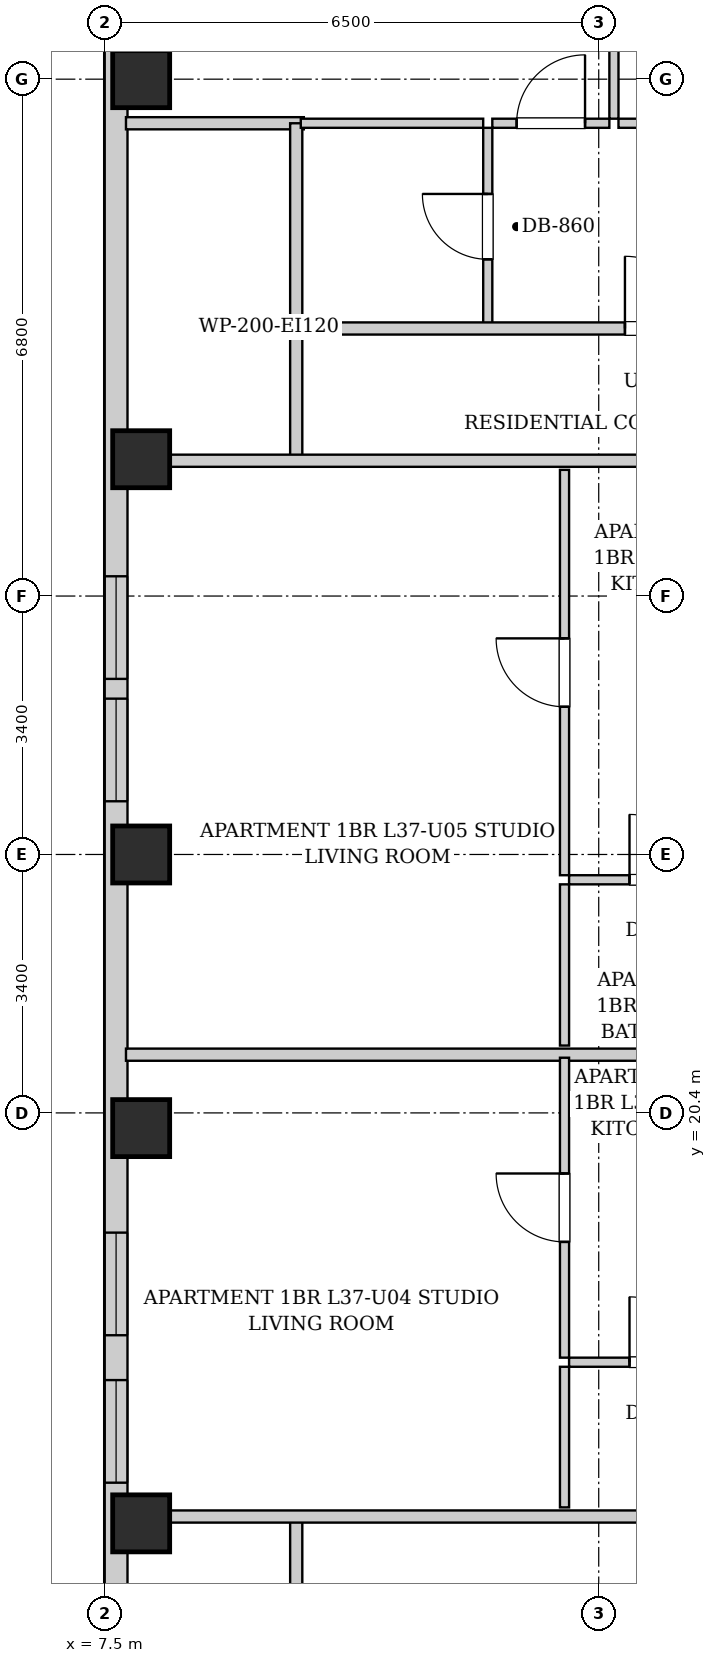
"""IFC4 building model, lengths in metres.
Left out: names, types, materials, properties, quantities, classifications, styles, units other than length and angle.
Written with IfcOpenShell. Run it as: python <this file> out.ifc"""

import sys

from ifc_helpers import new_model, si_unit, direction, frame, frame_2d, origin, origin_2d, place, context, subcontext, project, spatial, rectangle, extrude, element, fill, save


model = new_model("IFC4")
c1 = context("Model", 3, precision=1e-05, world=origin(), true_north=direction((0.0, 1.0)))
c2 = subcontext(c1, "Body", "Model", "MODEL_VIEW")
j1 = project(units=[si_unit("LENGTHUNIT", "METRE"), si_unit("PLANEANGLEUNIT", "RADIAN")], contexts=[c1])
p1 = place(None, origin())
s1 = spatial("IfcSite", under=j1, at=p1, CompositionType="ELEMENT")
p2 = place(p1, origin())
s2 = spatial("IfcBuilding", under=s1, at=p2, CompositionType="ELEMENT")
p3 = place(p2, frame((0.0, 0.0, 130.9)))
s3 = spatial("IfcBuildingStorey", under=s2, at=p3, CompositionType="ELEMENT", Elevation=130.9)
for number, where, z_axis, x_axis in (
    (1, (7.98, 15.0, 0.0), (0.0, 0.0, 1.0), (1.0, 0.0, 0.0)),
    (2, (7.98, 20.2, 0.0), (0.0, 0.0, 1.0), (1.0, 0.0, 0.0)),
    (3, (7.98, 23.8, 0.0), (0.0, 0.0, 1.0), (1.0, 0.0, 0.0)),
    (4, (7.98, 29.0, 0.0), (0.0, 0.0, 1.0), (1.0, 0.0, 0.0)),
    (5, (7.98, 34.0, 0.0), (0.0, 0.0, 1.0), (1.0, 0.0, 0.0)),
):
    element("IfcColumn", number, at=place(p3, frame(where, z_axis=z_axis, x_axis=x_axis)), inside=s3, PredefinedType="COLUMN", context=c2, shape_type="SweptSolid", body=[
        extrude(rectangle(XDim=0.75, YDim=0.75, at=origin_2d()), origin(), (0.0, 0.0, 1.0), 3.25),
    ])
p4 = place(p3, frame((7.65, 6.3, 0.0), z_axis=(0.0, 0.0, 1.0), x_axis=(0.0, 1.0, 0.0)))
e6 = element("IfcWall", 6, at=p4, inside=s3, PredefinedType="SOLIDWALL", context=c2, shape_type="SweptSolid", body=[
    extrude(rectangle(XDim=34.5, YDim=0.3, at=frame_2d((17.25, 0.0))), origin(), (0.0, 0.0, 1.0), 2.99),
])
p5 = place(p4, frame((1.575, 0.0, 0.55)))
e7 = element("IfcOpeningElement", 7, at=p5, cuts=e6, PredefinedType="OPENING", context=c2, shape_type="SweptSolid", body=[
    extrude(rectangle(XDim=1.35, YDim=1.2, at=frame_2d((0.675, 0.6))), frame((0.0, 0.16, 0.0), z_axis=(0.0, -1.0, 0.0), x_axis=(1.0, 0.0, 0.0)), (0.0, 0.0, 1.0), 0.32),
])
p6 = place(p4, frame((30.075, 0.0, 0.55)))
e8 = element("IfcOpeningElement", 8, at=p6, cuts=e6, PredefinedType="OPENING", context=c2, shape_type="SweptSolid", body=[
    extrude(rectangle(XDim=1.35, YDim=1.2, at=frame_2d((0.675, 0.6))), frame((0.0, 0.16, 0.0), z_axis=(0.0, -1.0, 0.0), x_axis=(1.0, 0.0, 0.0)), (0.0, 0.0, 1.0), 0.32),
])
p7 = place(p4, frame((28.235, 0.0, 0.55)))
e9 = element("IfcOpeningElement", 9, at=p7, cuts=e6, PredefinedType="OPENING", context=c2, shape_type="SweptSolid", body=[
    extrude(rectangle(XDim=1.35, YDim=1.2, at=frame_2d((0.675, 0.6))), frame((0.0, 0.16, 0.0), z_axis=(0.0, -1.0, 0.0), x_axis=(1.0, 0.0, 0.0)), (0.0, 0.0, 1.0), 0.32),
])
p8 = place(p4, frame((11.175, 0.0, 0.55)))
e10 = element("IfcOpeningElement", 10, at=p8, cuts=e6, PredefinedType="OPENING", context=c2, shape_type="SweptSolid", body=[
    extrude(rectangle(XDim=1.35, YDim=1.2, at=frame_2d((0.675, 0.6))), frame((0.0, 0.16, 0.0), z_axis=(0.0, -1.0, 0.0), x_axis=(1.0, 0.0, 0.0)), (0.0, 0.0, 1.0), 0.32),
])
p9 = place(p4, frame((9.235, 0.0, 0.55)))
e11 = element("IfcOpeningElement", 11, at=p9, cuts=e6, PredefinedType="OPENING", context=c2, shape_type="SweptSolid", body=[
    extrude(rectangle(XDim=1.35, YDim=1.2, at=frame_2d((0.675, 0.6))), frame((0.0, 0.16, 0.0), z_axis=(0.0, -1.0, 0.0), x_axis=(1.0, 0.0, 0.0)), (0.0, 0.0, 1.0), 0.32),
])
p10 = place(p4, frame((18.2, 0.0, 0.55)))
e12 = element("IfcOpeningElement", 12, at=p10, cuts=e6, PredefinedType="OPENING", context=c2, shape_type="SweptSolid", body=[
    extrude(rectangle(XDim=1.35, YDim=1.2, at=frame_2d((0.675, 0.6))), frame((0.0, 0.16, 0.0), z_axis=(0.0, -1.0, 0.0), x_axis=(1.0, 0.0, 0.0)), (0.0, 0.0, 1.0), 0.32),
])
p11 = place(p4, frame((19.81, 0.0, 0.55)))
e13 = element("IfcOpeningElement", 13, at=p11, cuts=e6, PredefinedType="OPENING", context=c2, shape_type="SweptSolid", body=[
    extrude(rectangle(XDim=1.35, YDim=1.2, at=frame_2d((0.675, 0.6))), frame((0.0, 0.16, 0.0), z_axis=(0.0, -1.0, 0.0), x_axis=(1.0, 0.0, 0.0)), (0.0, 0.0, 1.0), 0.32),
])
for number, where, z_axis, x_axis in (
    (14, (10.02, 13.35, 0.0), (0.0, 0.0, 1.0), (0.0, 1.0, 0.0)),
    (15, (10.02, 28.98, 0.0), (0.0, 0.0, 1.0), (0.0, 1.0, 0.0)),
):
    element("IfcWall", number, at=place(p3, frame(where, z_axis=z_axis, x_axis=x_axis)), inside=s3, PredefinedType="PARTITIONING", context=c2, shape_type="SweptSolid", body=[
        extrude(rectangle(XDim=1.74, YDim=0.16, at=frame_2d((0.87, 0.0))), origin(), (0.0, 0.0, 1.0), 2.99),
    ])
for number, where, z_axis, x_axis in (
    (16, (7.78, 15.09, 0.0), (0.0, 0.0, 1.0), (1.0, 0.0, 0.0)),
    (17, (7.78, 28.98, 0.0), (0.0, 0.0, 1.0), (1.0, 0.0, 0.0)),
):
    element("IfcWall", number, at=place(p3, frame(where, z_axis=z_axis, x_axis=x_axis)), inside=s3, PredefinedType="PARTITIONING", context=c2, shape_type="SweptSolid", body=[
        extrude(rectangle(XDim=8.36, YDim=0.16, at=frame_2d((4.18, 0.0))), origin(), (0.0, 0.0, 1.0), 2.426),
    ])
p12 = place(p3, frame((7.78, 33.42, 0.0), z_axis=(0.0, 0.0, 1.0), x_axis=(1.0, 0.0, 0.0)))
e18 = element("IfcWall", 18, at=p12, inside=s3, PredefinedType="PARTITIONING", context=c2, shape_type="SweptSolid", body=[
    extrude(rectangle(XDim=2.34, YDim=0.16, at=frame_2d((1.17, 0.0))), origin(), (0.0, 0.0, 1.0), 2.99),
])
p13 = place(p3, frame((10.02, 30.76, 0.0), z_axis=(0.0, 0.0, 1.0), x_axis=(0.0, 1.0, 0.0)))
e19 = element("IfcWall", 19, at=p13, inside=s3, PredefinedType="PARTITIONING", context=c2, shape_type="SweptSolid", body=[
    extrude(rectangle(XDim=2.66, YDim=0.16, at=frame_2d((1.33, 0.0))), origin(), (0.0, 0.0, 1.0), 2.99),
])
p14 = place(p3, frame((12.54, 30.76, 0.0), z_axis=(0.0, 0.0, 1.0), x_axis=(0.0, 1.0, 0.0)))
e20 = element("IfcWall", 20, at=p14, inside=s3, PredefinedType="PARTITIONING", context=c2, shape_type="SweptSolid", body=[
    extrude(rectangle(XDim=2.6, YDim=0.12, at=frame_2d((1.3, 0.0))), origin(), (0.0, 0.0, 1.0), 2.99),
])
p15 = place(p14, frame((0.87, 0.0, 0.0)))
e21 = element("IfcOpeningElement", 21, at=p15, cuts=e20, PredefinedType="OPENING", context=c2, shape_type="SweptSolid", body=[
    extrude(rectangle(XDim=0.86, YDim=2.05, at=frame_2d((0.43, 1.025))), frame((0.0, 0.07, 0.0), z_axis=(0.0, -1.0, 0.0), x_axis=(1.0, 0.0, 0.0)), (0.0, 0.0, 1.0), 0.14),
])
p16 = place(p3, frame((10.08, 33.42, 0.0), z_axis=(0.0, 0.0, 1.0), x_axis=(1.0, 0.0, 0.0)))
e22 = element("IfcWall", 22, at=p16, inside=s3, PredefinedType="PARTITIONING", context=c2, shape_type="SweptSolid", body=[
    extrude(rectangle(XDim=2.4, YDim=0.12, at=frame_2d((1.2, 0.0))), origin(), (0.0, 0.0, 1.0), 2.99),
])
p17 = place(p3, frame((12.6, 33.42, 0.0), z_axis=(0.0, 0.0, 1.0), x_axis=(1.0, 0.0, 0.0)))
e23 = element("IfcWall", 23, at=p17, inside=s3, PredefinedType="PARTITIONING", context=c2, shape_type="SweptSolid", body=[
    extrude(rectangle(XDim=1.54, YDim=0.12, at=frame_2d((0.77, 0.0))), origin(), (0.0, 0.0, 1.0), 2.99),
])
p18 = place(p17, frame((0.32, 0.0, 0.0)))
e24 = element("IfcOpeningElement", 24, at=p18, cuts=e23, PredefinedType="OPENING", context=c2, shape_type="SweptSolid", body=[
    extrude(rectangle(XDim=0.9, YDim=2.05, at=frame_2d((0.45, 1.025))), frame((0.0, 0.07, 0.0), z_axis=(0.0, -1.0, 0.0), x_axis=(1.0, 0.0, 0.0)), (0.0, 0.0, 1.0), 0.14),
])
p19 = place(p3, frame((14.26, 33.42, 0.0), z_axis=(0.0, 0.0, 1.0), x_axis=(1.0, 0.0, 0.0)))
e25 = element("IfcWall", 25, at=p19, inside=s3, PredefinedType="PARTITIONING", context=c2, shape_type="SweptSolid", body=[
    extrude(rectangle(XDim=2.78, YDim=0.12, at=frame_2d((1.39, 0.0))), origin(), (0.0, 0.0, 1.0), 2.99),
])
p20 = place(p19, frame((0.94, 0.0, 0.0)))
e26 = element("IfcOpeningElement", 26, at=p20, cuts=e25, PredefinedType="OPENING", context=c2, shape_type="SweptSolid", body=[
    extrude(rectangle(XDim=0.9, YDim=2.05, at=frame_2d((0.45, 1.025))), frame((0.0, 0.07, 0.0), z_axis=(0.0, -1.0, 0.0), x_axis=(1.0, 0.0, 0.0)), (0.0, 0.0, 1.0), 0.14),
])
p21 = place(p3, frame((14.2, 33.48, 0.0), z_axis=(0.0, 0.0, 1.0), x_axis=(0.0, 1.0, 0.0)))
e27 = element("IfcWall", 27, at=p21, inside=s3, PredefinedType="PARTITIONING", context=c2, shape_type="SweptSolid", body=[
    extrude(rectangle(XDim=9.54, YDim=0.12, at=frame_2d((4.77, 0.0))), origin(), (0.0, 0.0, 1.0), 2.99),
])
p22 = place(p21, frame((4.305, 0.0, 0.0)))
e28 = element("IfcOpeningElement", 28, at=p22, cuts=e27, PredefinedType="OPENING", context=c2, shape_type="SweptSolid", body=[
    extrude(rectangle(XDim=0.9, YDim=2.05, at=frame_2d((0.45, 1.025))), frame((0.0, 0.07, 0.0), z_axis=(0.0, -1.0, 0.0), x_axis=(1.0, 0.0, 0.0)), (0.0, 0.0, 1.0), 0.14),
])
p23 = place(p3, frame((7.78, 21.166, 0.0), z_axis=(0.0, 0.0, 1.0), x_axis=(1.0, 0.0, 0.0)))
e29 = element("IfcWall", 29, at=p23, inside=s3, PredefinedType="PARTITIONING", context=c2, shape_type="SweptSolid", body=[
    extrude(rectangle(XDim=8.28, YDim=0.16, at=frame_2d((4.14, 0.0))), origin(), (0.0, 0.0, 1.0), 2.99),
])
p24 = place(p3, frame((13.61, 17.12, 0.0), z_axis=(0.0, 0.0, 1.0), x_axis=(1.0, 0.0, 0.0)))
e30 = element("IfcWall", 30, at=p24, inside=s3, PredefinedType="PARTITIONING", context=c2, shape_type="SweptSolid", body=[
    extrude(rectangle(XDim=2.45, YDim=0.12, at=frame_2d((1.225, 0.0))), origin(), (0.0, 0.0, 1.0), 2.99),
])
p25 = place(p24, frame((0.795, 0.0, 0.0)))
e31 = element("IfcOpeningElement", 31, at=p25, cuts=e30, PredefinedType="OPENING", context=c2, shape_type="SweptSolid", body=[
    extrude(rectangle(XDim=0.86, YDim=2.05, at=frame_2d((0.43, 1.025))), frame((0.0, 0.07, 0.0), z_axis=(0.0, -1.0, 0.0), x_axis=(1.0, 0.0, 0.0)), (0.0, 0.0, 1.0), 0.14),
])
p26 = place(p3, frame((13.55, 15.21, 0.0), z_axis=(0.0, 0.0, 1.0), x_axis=(0.0, 1.0, 0.0)))
e32 = element("IfcWall", 32, at=p26, inside=s3, PredefinedType="PARTITIONING", context=c2, shape_type="SweptSolid", body=[
    extrude(rectangle(XDim=1.85, YDim=0.12, at=frame_2d((0.925, 0.0))), origin(), (0.0, 0.0, 1.0), 2.99),
])
p27 = place(p3, frame((13.55, 17.18, 0.0), z_axis=(0.0, 0.0, 1.0), x_axis=(0.0, 1.0, 0.0)))
e33 = element("IfcWall", 33, at=p27, inside=s3, PredefinedType="PARTITIONING", context=c2, shape_type="SweptSolid", body=[
    extrude(rectangle(XDim=3.946, YDim=0.12, at=frame_2d((1.973, 0.0))), origin(), (0.0, 0.0, 1.0), 2.99),
])
p28 = place(p27, frame((1.523, 0.0, 0.0)))
e34 = element("IfcOpeningElement", 34, at=p28, cuts=e33, PredefinedType="OPENING", context=c2, shape_type="SweptSolid", body=[
    extrude(rectangle(XDim=0.9, YDim=2.05, at=frame_2d((0.45, 1.025))), frame((0.0, 0.07, 0.0), z_axis=(0.0, -1.0, 0.0), x_axis=(1.0, 0.0, 0.0)), (0.0, 0.0, 1.0), 0.14),
])
p29 = place(p3, frame((13.61, 23.467, 0.0), z_axis=(0.0, 0.0, 1.0), x_axis=(1.0, 0.0, 0.0)))
e35 = element("IfcWall", 35, at=p29, inside=s3, PredefinedType="PARTITIONING", context=c2, shape_type="SweptSolid", body=[
    extrude(rectangle(XDim=2.45, YDim=0.12, at=frame_2d((1.225, 0.0))), origin(), (0.0, 0.0, 1.0), 2.99),
])
p30 = place(p29, frame((0.795, 0.0, 0.0)))
e36 = element("IfcOpeningElement", 36, at=p30, cuts=e35, PredefinedType="OPENING", context=c2, shape_type="SweptSolid", body=[
    extrude(rectangle(XDim=0.86, YDim=2.05, at=frame_2d((0.43, 1.025))), frame((0.0, 0.07, 0.0), z_axis=(0.0, -1.0, 0.0), x_axis=(1.0, 0.0, 0.0)), (0.0, 0.0, 1.0), 0.14),
])
p31 = place(p3, frame((13.55, 21.286, 0.0), z_axis=(0.0, 0.0, 1.0), x_axis=(0.0, 1.0, 0.0)))
e37 = element("IfcWall", 37, at=p31, inside=s3, PredefinedType="PARTITIONING", context=c2, shape_type="SweptSolid", body=[
    extrude(rectangle(XDim=2.121, YDim=0.12, at=frame_2d((1.061, 0.0))), origin(), (0.0, 0.0, 1.0), 2.99),
])
p32 = place(p3, frame((13.55, 23.527, 0.0), z_axis=(0.0, 0.0, 1.0), x_axis=(0.0, 1.0, 0.0)))
e38 = element("IfcWall", 38, at=p32, inside=s3, PredefinedType="PARTITIONING", context=c2, shape_type="SweptSolid", body=[
    extrude(rectangle(XDim=5.333, YDim=0.12, at=frame_2d((2.667, 0.0))), origin(), (0.0, 0.0, 1.0), 2.99),
])
p33 = place(p32, frame((2.216, 0.0, 0.0)))
e39 = element("IfcOpeningElement", 39, at=p33, cuts=e38, PredefinedType="OPENING", context=c2, shape_type="SweptSolid", body=[
    extrude(rectangle(XDim=0.9, YDim=2.05, at=frame_2d((0.45, 1.025))), frame((0.0, 0.07, 0.0), z_axis=(0.0, -1.0, 0.0), x_axis=(1.0, 0.0, 0.0)), (0.0, 0.0, 1.0), 0.14),
])
p34 = place(p3, frame((10.05, 30.72, 0.0), z_axis=(0.0, 0.0, 1.0), x_axis=(1.0, 0.0, 0.0)))
e40 = element("IfcWall", 40, at=p34, inside=s3, PredefinedType="PARTITIONING", context=c2, shape_type="SweptSolid", body=[
    extrude(rectangle(XDim=27.7, YDim=0.16, at=frame_2d((13.85, 0.0))), origin(), (0.0, 0.0, 1.0), 2.99),
])
p35 = place(p34, frame((4.295, 0.0, 0.0)))
e41 = element("IfcOpeningElement", 41, at=p35, cuts=e40, PredefinedType="OPENING", context=c2, shape_type="SweptSolid", body=[
    extrude(rectangle(XDim=0.95, YDim=2.1, at=frame_2d((0.475, 1.05))), frame((0.0, 0.09, 0.0), z_axis=(0.0, -1.0, 0.0), x_axis=(1.0, 0.0, 0.0)), (0.0, 0.0, 1.0), 0.18),
])
p36 = place(p34, frame((23.785, 0.0, 0.0)))
e42 = element("IfcOpeningElement", 42, at=p36, cuts=e40, PredefinedType="OPENING", context=c2, shape_type="SweptSolid", body=[
    extrude(rectangle(XDim=0.95, YDim=2.1, at=frame_2d((0.475, 1.05))), frame((0.0, 0.09, 0.0), z_axis=(0.0, -1.0, 0.0), x_axis=(1.0, 0.0, 0.0)), (0.0, 0.0, 1.0), 0.18),
])
p37 = place(p15, origin())
e43 = element("IfcDoor", 43, at=p37, inside=s3, OperationType="SINGLE_SWING_RIGHT", PredefinedType="DOOR", context=c2, shape_type="SweptSolid", body=[
    extrude(rectangle(XDim=0.86, YDim=2.05, at=frame_2d((0.43, 1.025))), frame((0.0, 0.025, 0.0), z_axis=(0.0, -1.0, 0.0), x_axis=(1.0, 0.0, 0.0)), (0.0, 0.0, 1.0), 0.05),
])
fill(e21, e43)
p38 = place(p18, origin())
e44 = element("IfcDoor", 44, at=p38, inside=s3, OperationType="SINGLE_SWING_RIGHT", PredefinedType="DOOR", context=c2, shape_type="SweptSolid", body=[
    extrude(rectangle(XDim=0.9, YDim=2.05, at=frame_2d((0.45, 1.025))), frame((0.0, 0.025, 0.0), z_axis=(0.0, -1.0, 0.0), x_axis=(1.0, 0.0, 0.0)), (0.0, 0.0, 1.0), 0.05),
])
fill(e24, e44)
p39 = place(p25, origin())
e45 = element("IfcDoor", 45, at=p39, inside=s3, OperationType="SINGLE_SWING_LEFT", PredefinedType="DOOR", context=c2, shape_type="SweptSolid", body=[
    extrude(rectangle(XDim=0.86, YDim=2.05, at=frame_2d((0.43, 1.025))), frame((0.0, 0.025, 0.0), z_axis=(0.0, -1.0, 0.0), x_axis=(1.0, 0.0, 0.0)), (0.0, 0.0, 1.0), 0.05),
])
fill(e31, e45)
p40 = place(p28, origin())
e46 = element("IfcDoor", 46, at=p40, inside=s3, OperationType="SINGLE_SWING_RIGHT", PredefinedType="DOOR", context=c2, shape_type="SweptSolid", body=[
    extrude(rectangle(XDim=0.9, YDim=2.05, at=frame_2d((0.45, 1.025))), frame((0.0, 0.025, 0.0), z_axis=(0.0, -1.0, 0.0), x_axis=(1.0, 0.0, 0.0)), (0.0, 0.0, 1.0), 0.05),
])
fill(e34, e46)
p41 = place(p30, origin())
e47 = element("IfcDoor", 47, at=p41, inside=s3, OperationType="SINGLE_SWING_LEFT", PredefinedType="DOOR", context=c2, shape_type="SweptSolid", body=[
    extrude(rectangle(XDim=0.86, YDim=2.05, at=frame_2d((0.43, 1.025))), frame((0.0, 0.025, 0.0), z_axis=(0.0, -1.0, 0.0), x_axis=(1.0, 0.0, 0.0)), (0.0, 0.0, 1.0), 0.05),
])
fill(e36, e47)
p42 = place(p33, origin())
e48 = element("IfcDoor", 48, at=p42, inside=s3, OperationType="SINGLE_SWING_RIGHT", PredefinedType="DOOR", context=c2, shape_type="SweptSolid", body=[
    extrude(rectangle(XDim=0.9, YDim=2.05, at=frame_2d((0.45, 1.025))), frame((0.0, 0.025, 0.0), z_axis=(0.0, -1.0, 0.0), x_axis=(1.0, 0.0, 0.0)), (0.0, 0.0, 1.0), 0.05),
])
fill(e39, e48)
p43 = place(p35, origin())
e49 = element("IfcDoor", 49, at=p43, inside=s3, OperationType="SINGLE_SWING_LEFT", PredefinedType="DOOR", context=c2, shape_type="SweptSolid", body=[
    extrude(rectangle(XDim=0.95, YDim=2.1, at=frame_2d((0.475, 1.05))), frame((0.0, 0.025, 0.0), z_axis=(0.0, -1.0, 0.0), x_axis=(1.0, 0.0, 0.0)), (0.0, 0.0, 1.0), 0.05),
])
fill(e41, e49)
p44 = place(p8, origin())
e50 = element("IfcWindow", 50, at=p44, inside=s3, PartitioningType="SINGLE_PANEL", PredefinedType="WINDOW", context=c2, shape_type="SweptSolid", body=[
    extrude(rectangle(XDim=1.35, YDim=1.2, at=frame_2d((0.675, 0.6))), frame((0.0, 0.03, 0.0), z_axis=(0.0, -1.0, 0.0), x_axis=(1.0, 0.0, 0.0)), (0.0, 0.0, 1.0), 0.06),
])
fill(e10, e50)
p45 = place(p9, origin())
e51 = element("IfcWindow", 51, at=p45, inside=s3, PartitioningType="SINGLE_PANEL", PredefinedType="WINDOW", context=c2, shape_type="SweptSolid", body=[
    extrude(rectangle(XDim=1.35, YDim=1.2, at=frame_2d((0.675, 0.6))), frame((0.0, 0.03, 0.0), z_axis=(0.0, -1.0, 0.0), x_axis=(1.0, 0.0, 0.0)), (0.0, 0.0, 1.0), 0.06),
])
fill(e11, e51)
p46 = place(p10, origin())
e52 = element("IfcWindow", 52, at=p46, inside=s3, PartitioningType="SINGLE_PANEL", PredefinedType="WINDOW", context=c2, shape_type="SweptSolid", body=[
    extrude(rectangle(XDim=1.35, YDim=1.2, at=frame_2d((0.675, 0.6))), frame((0.0, 0.03, 0.0), z_axis=(0.0, -1.0, 0.0), x_axis=(1.0, 0.0, 0.0)), (0.0, 0.0, 1.0), 0.06),
])
fill(e12, e52)
p47 = place(p11, origin())
e53 = element("IfcWindow", 53, at=p47, inside=s3, PartitioningType="SINGLE_PANEL", PredefinedType="WINDOW", context=c2, shape_type="SweptSolid", body=[
    extrude(rectangle(XDim=1.35, YDim=1.2, at=frame_2d((0.675, 0.6))), frame((0.0, 0.03, 0.0), z_axis=(0.0, -1.0, 0.0), x_axis=(1.0, 0.0, 0.0)), (0.0, 0.0, 1.0), 0.06),
])
fill(e13, e53)
save(model, sys.argv[1])
